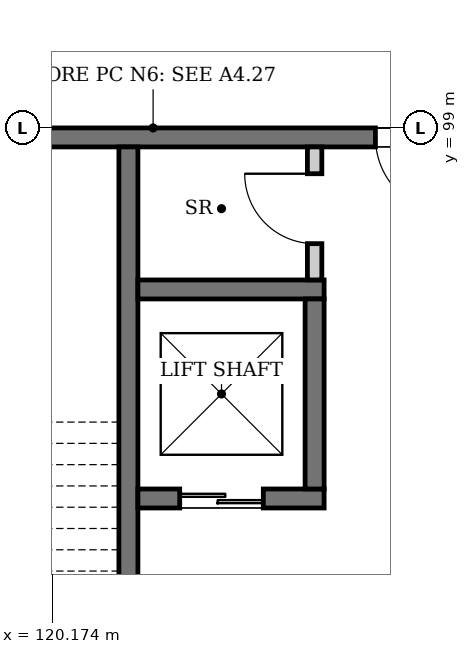
"""IFC4 building model, lengths in metres.
Left out: names, types, materials, properties, quantities, classifications, styles, units other than length and angle.
Written with IfcOpenShell. Run it as: python <this file> out.ifc"""

import sys

from ifc_helpers import new_model, si_unit, direction, frame, frame_2d, origin, place, context, subcontext, project, spatial, rectangle, extrude, element, fill, save


model = new_model("IFC4")
c1 = context("Model", 3, precision=1e-05, world=origin(), true_north=direction((0.0, 1.0)))
c2 = subcontext(c1, "Body", "Model", "MODEL_VIEW")
j1 = project(units=[si_unit("LENGTHUNIT", "METRE"), si_unit("PLANEANGLEUNIT", "RADIAN")], contexts=[c1])
p1 = place(None, origin())
s1 = spatial("IfcSite", under=j1, at=p1, CompositionType="ELEMENT")
p2 = place(p1, origin())
s2 = spatial("IfcBuilding", under=s1, at=p2, CompositionType="ELEMENT")
p3 = place(p2, frame((0.0, 0.0, 10.5)))
s3 = spatial("IfcBuildingStorey", under=s2, at=p3, CompositionType="ELEMENT", Elevation=10.5)
p4 = place(p3, frame((117.25, 98.875, 0.0), z_axis=(0.0, 0.0, 1.0), x_axis=(1.0, 0.0, 0.0)))
e1 = element("IfcWall", 1, at=p4, inside=s3, PredefinedType="SHEAR", context=c2, shape_type="SweptSolid", body=[
    extrude(rectangle(XDim=8.5, YDim=0.25, at=frame_2d((4.25, 0.0))), origin(), (0.0, 0.0, 1.0), 4.35),
])
p5 = place(p4, frame((7.175, 0.0, 0.0)))
e2 = element("IfcOpeningElement", 2, at=p5, cuts=e1, PredefinedType="OPENING", context=c2, shape_type="SweptSolid", body=[
    extrude(rectangle(XDim=1.0, YDim=2.1, at=frame_2d((0.5, 1.05))), frame((0.0, 0.135, 0.0), z_axis=(0.0, -1.0, 0.0), x_axis=(1.0, 0.0, 0.0)), (0.0, 0.0, 1.0), 0.27),
])
p6 = place(p3, frame((121.175, 90.25, 0.0), z_axis=(0.0, 0.0, 1.0), x_axis=(0.0, 1.0, 0.0)))
e3 = element("IfcWall", 3, at=p6, inside=s3, PredefinedType="SOLIDWALL", context=c2, shape_type="SweptSolid", body=[
    extrude(rectangle(XDim=8.5, YDim=0.25, at=frame_2d((4.25, 0.0))), origin(), (0.0, 0.0, 1.0), 4.35),
])
p7 = place(p6, frame((0.4, 0.0, 0.0)))
e4 = element("IfcOpeningElement", 4, at=p7, cuts=e3, PredefinedType="OPENING", context=c2, shape_type="SweptSolid", body=[
    extrude(rectangle(XDim=1.0, YDim=2.1, at=frame_2d((0.5, 1.05))), frame((0.0, 0.135, 0.0), z_axis=(0.0, -1.0, 0.0), x_axis=(1.0, 0.0, 0.0)), (0.0, 0.0, 1.0), 0.27),
])
p8 = place(p3, frame((121.3, 94.125, 0.0), z_axis=(0.0, 0.0, 1.0), x_axis=(1.0, 0.0, 0.0)))
e5 = element("IfcWall", 5, at=p8, inside=s3, PredefinedType="SOLIDWALL", context=c2, shape_type="SweptSolid", body=[
    extrude(rectangle(XDim=2.45, YDim=0.25, at=frame_2d((1.225, 0.0))), origin(), (0.0, 0.0, 1.0), 4.35),
])
p9 = place(p8, frame((0.55, 0.0, 0.0)))
e6 = element("IfcOpeningElement", 6, at=p9, cuts=e5, PredefinedType="OPENING", context=c2, shape_type="SweptSolid", body=[
    extrude(rectangle(XDim=1.1, YDim=2.1, at=frame_2d((0.55, 1.05))), frame((0.0, 0.135, 0.0), z_axis=(0.0, -1.0, 0.0), x_axis=(1.0, 0.0, 0.0)), (0.0, 0.0, 1.0), 0.27),
])
p10 = place(p3, frame((121.3, 96.875, 0.0), z_axis=(0.0, 0.0, 1.0), x_axis=(1.0, 0.0, 0.0)))
e7 = element("IfcWall", 7, at=p10, inside=s3, PredefinedType="SOLIDWALL", context=c2, shape_type="SweptSolid", body=[
    extrude(rectangle(XDim=2.45, YDim=0.25, at=frame_2d((1.225, 0.0))), origin(), (0.0, 0.0, 1.0), 4.35),
])
p11 = place(p3, frame((123.625, 94.25, 0.0), z_axis=(0.0, 0.0, 1.0), x_axis=(0.0, 1.0, 0.0)))
e8 = element("IfcWall", 8, at=p11, inside=s3, PredefinedType="SOLIDWALL", context=c2, shape_type="SweptSolid", body=[
    extrude(rectangle(XDim=2.5, YDim=0.25, at=frame_2d((1.25, 0.0))), origin(), (0.0, 0.0, 1.0), 4.35),
])
p12 = place(p3, frame((123.625, 97.0, 0.0), z_axis=(0.0, 0.0, 1.0), x_axis=(0.0, 1.0, 0.0)))
e9 = element("IfcWall", 9, at=p12, inside=s3, PredefinedType="PARTITIONING", context=c2, shape_type="SweptSolid", body=[
    extrude(rectangle(XDim=1.75, YDim=0.19, at=frame_2d((0.875, 0.0))), origin(), (0.0, 0.0, 1.0), 4.35),
])
p13 = place(p12, frame((0.478, 0.0, 0.0)))
e10 = element("IfcOpeningElement", 10, at=p13, cuts=e9, PredefinedType="OPENING", context=c2, shape_type="SweptSolid", body=[
    extrude(rectangle(XDim=0.92, YDim=2.1, at=frame_2d((0.46, 1.05))), frame((0.0, 0.105, 0.0), z_axis=(0.0, -1.0, 0.0), x_axis=(1.0, 0.0, 0.0)), (0.0, 0.0, 1.0), 0.21),
])
p14 = place(p9, origin())
e11 = element("IfcDoor", 11, at=p14, inside=s3, OperationType="DOUBLE_DOOR_SLIDING", PredefinedType="DOOR", context=c2, shape_type="SweptSolid", body=[
    extrude(rectangle(XDim=1.1, YDim=2.1, at=frame_2d((0.55, 1.05))), frame((0.0, 0.025, 0.0), z_axis=(0.0, -1.0, 0.0), x_axis=(1.0, 0.0, 0.0)), (0.0, 0.0, 1.0), 0.05),
])
fill(e6, e11)
p15 = place(p13, origin())
e12 = element("IfcDoor", 12, at=p15, inside=s3, OperationType="SINGLE_SWING_RIGHT", PredefinedType="DOOR", context=c2, shape_type="SweptSolid", body=[
    extrude(rectangle(XDim=0.92, YDim=2.1, at=frame_2d((0.46, 1.05))), frame((0.0, 0.025, 0.0), z_axis=(0.0, -1.0, 0.0), x_axis=(1.0, 0.0, 0.0)), (0.0, 0.0, 1.0), 0.05),
])
fill(e10, e12)
p16 = place(p5, frame((1.0, 0.0, 0.0), z_axis=(0.0, 0.0, 1.0), x_axis=(-1.0, 0.0, 0.0)))
e13 = element("IfcDoor", 13, at=p16, inside=s3, OperationType="SINGLE_SWING_LEFT", PredefinedType="DOOR", context=c2, shape_type="SweptSolid", body=[
    extrude(rectangle(XDim=1.0, YDim=2.1, at=frame_2d((0.5, 1.05))), frame((0.0, 0.025, 0.0), z_axis=(0.0, -1.0, 0.0), x_axis=(1.0, 0.0, 0.0)), (0.0, 0.0, 1.0), 0.05),
])
fill(e2, e13)
save(model, sys.argv[1])
